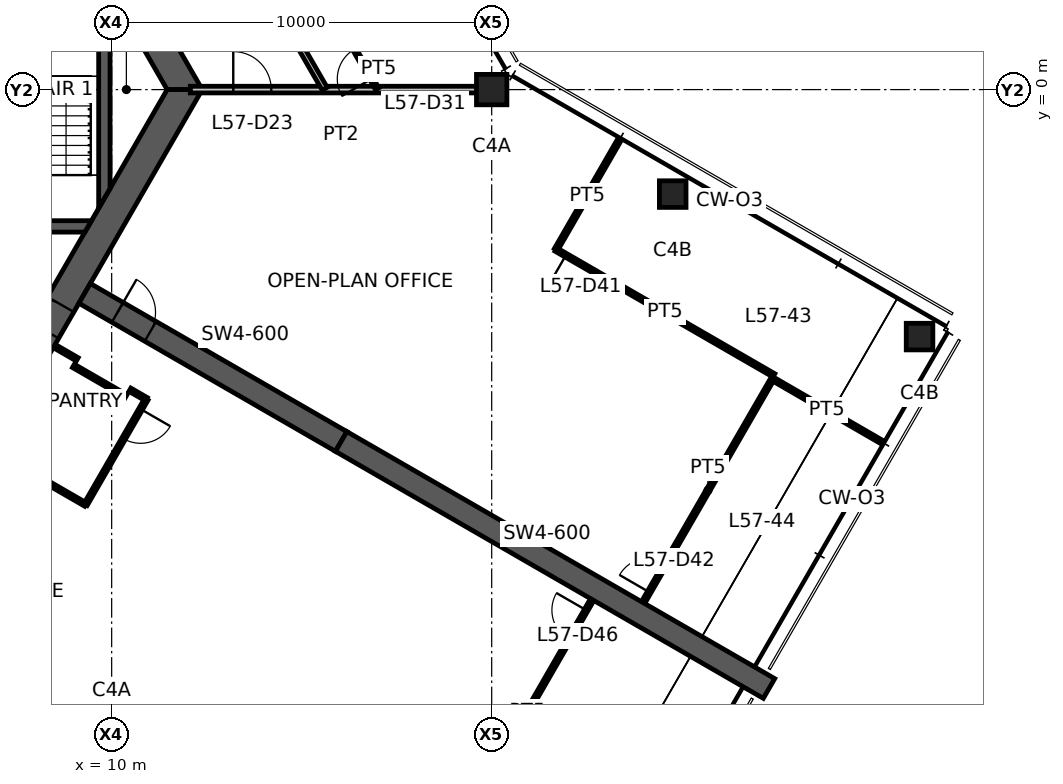
"""IFC4 building model, lengths in metres.
Left out: names, types, materials, properties, quantities, classifications, styles, units other than length and angle.
Written with IfcOpenShell. Run it as: python <this file> out.ifc"""

import sys

from ifc_helpers import new_model, si_unit, direction, frame, frame_2d, origin, origin_2d, place, context, subcontext, project, spatial, polyline, rectangle, hollow_rectangle, outline, extrude, element, fill, save


model = new_model("IFC4")
c1 = context("Model", 3, precision=1e-05, world=origin(), true_north=direction((0.0, 1.0)))
c2 = subcontext(c1, "Body", "Model", "MODEL_VIEW")
j1 = project(units=[si_unit("LENGTHUNIT", "METRE"), si_unit("PLANEANGLEUNIT", "RADIAN")], contexts=[c1])
p1 = place(None, origin())
s1 = spatial("IfcSite", under=j1, at=p1, CompositionType="ELEMENT")
p2 = place(p1, origin())
s2 = spatial("IfcBuilding", under=s1, at=p2, CompositionType="ELEMENT")
p3 = place(p2, frame((0.0, 0.0, 228.4)))
s3 = spatial("IfcBuildingStorey", under=s2, at=p3, CompositionType="ELEMENT", Elevation=228.4)
p4 = place(p3, frame((20.0, 0.0, 0.0), z_axis=(0.0, 0.0, 1.0), x_axis=(1.0, 0.0, 0.0)))
e1 = element("IfcColumn", 1, at=p4, inside=s3, PredefinedType="COLUMN", context=c2, shape_type="SweptSolid", body=[
    extrude(hollow_rectangle(XDim=0.8, YDim=0.8, WallThickness=0.04, at=origin_2d()), origin(), (0.0, 0.0, 1.0), 3.9),
])
for number, where, z_axis, x_axis in (
    (2, (24.763, -2.75, 0.0), (0.0, 0.0, 1.0), (1.0, 0.0, 0.0)),
    (3, (31.258, -6.5, 0.0), (0.0, 0.0, 1.0), (1.0, 0.0, 0.0)),
):
    element("IfcColumn", number, at=place(p3, frame(where, z_axis=z_axis, x_axis=x_axis)), inside=s3, PredefinedType="COLUMN", context=c2, shape_type="SweptSolid", body=[
        extrude(hollow_rectangle(XDim=0.7, YDim=0.7, WallThickness=0.032, at=origin_2d()), origin(), (0.0, 0.0, 1.0), 3.9),
    ])
p5 = place(p3, frame((11.922, 0.0, 0.0), z_axis=(0.0, 0.0, 1.0), x_axis=(-0.500004296715, 0.866022923061, 0.0)))
e4 = element("IfcWall", 4, at=p5, inside=s3, PredefinedType="SHEAR", context=c2, shape_type="SweptSolid", body=[
    extrude(outline(polyline([(-0.231, -0.4), (5.835, -0.4), (6.635, -0.4), (12.153, -0.4), (11.691, 0.4), (6.635, 0.4), (5.835, 0.4), (0.231, 0.4), (-0.231, -0.4)])), origin(), (0.0, 0.0, 1.0), 3.9),
])
p6 = place(p5, frame((5.835, 0.0, 0.0)))
e5 = element("IfcOpeningElement", 5, at=p6, cuts=e4, PredefinedType="OPENING", context=c2, shape_type="SweptSolid", body=[
    extrude(rectangle(XDim=0.8, YDim=2.1, at=frame_2d((0.4, 1.05))), frame((0.0, 0.41, 0.0), z_axis=(0.0, -1.0, 0.0), x_axis=(1.0, 0.0, 0.0)), (0.0, 0.0, 1.0), 0.82),
])
p7 = place(p3, frame((5.961, -10.325, 0.0), z_axis=(0.0, 0.0, 1.0), x_axis=(0.500004296715, 0.866022923061, 0.0)))
e6 = element("IfcWall", 6, at=p7, inside=s3, PredefinedType="SHEAR", context=c2, shape_type="SweptSolid", body=[
    extrude(outline(polyline([(-0.231, -0.4), (4.594, -0.4), (5.394, -0.4), (12.153, -0.4), (11.691, 0.4), (5.394, 0.4), (4.594, 0.4), (0.231, 0.4), (-0.231, -0.4)])), origin(), (0.0, 0.0, 1.0), 3.9),
])
p8 = place(p7, frame((4.594, 0.0, 0.0)))
e7 = element("IfcOpeningElement", 7, at=p8, cuts=e6, PredefinedType="OPENING", context=c2, shape_type="SweptSolid", body=[
    extrude(rectangle(XDim=0.8, YDim=2.1, at=frame_2d((0.4, 1.05))), frame((0.0, 0.41, 0.0), z_axis=(0.0, -1.0, 0.0), x_axis=(1.0, 0.0, 0.0)), (0.0, 0.0, 1.0), 0.82),
])
p9 = place(p3, frame((9.288, -5.363, 0.0), z_axis=(0.0, 0.0, 1.0), x_axis=(0.866031736626, -0.499989031036, 0.0)))
e8 = element("IfcWall", 8, at=p9, inside=s3, PredefinedType="SHEAR", context=c2, shape_type="SweptSolid", body=[
    extrude(rectangle(XDim=7.796, YDim=0.6, at=frame_2d((3.898, 0.0))), origin(), (0.0, 0.0, 1.0), 3.9),
])
p10 = place(p9, frame((1.0, 0.0, 0.0)))
e9 = element("IfcOpeningElement", 9, at=p10, cuts=e8, PredefinedType="OPENING", context=c2, shape_type="SweptSolid", body=[
    extrude(rectangle(XDim=1.0, YDim=2.1, at=frame_2d((0.5, 1.05))), frame((0.0, 0.31, 0.0), z_axis=(0.0, -1.0, 0.0), x_axis=(1.0, 0.0, 0.0)), (0.0, 0.0, 1.0), 0.62),
])
p11 = place(p3, frame((16.039, -9.26, 0.0), z_axis=(0.0, 0.0, 1.0), x_axis=(0.866024837091, -0.50000098154, 0.0)))
e10 = element("IfcWall", 10, at=p11, inside=s3, PredefinedType="SHEAR", context=c2, shape_type="SweptSolid", body=[
    extrude(rectangle(XDim=13.0, YDim=0.6, at=frame_2d((6.5, 0.0))), origin(), (0.0, 0.0, 1.0), 3.9),
])
p12 = place(p3, frame((1.45, -3.6, 0.0), z_axis=(0.0, 0.0, 1.0), x_axis=(1.0, 0.0, 0.0)))
e11 = element("IfcWall", 11, at=p12, inside=s3, PredefinedType="SHEAR", context=c2, shape_type="SweptSolid", body=[
    extrude(outline(polyline([(0.0, -0.15), (1.05, -0.15), (2.15, -0.15), (7.845, -0.15), (8.019, 0.15), (2.15, 0.15), (1.05, 0.15), (0.0, 0.15), (0.0, -0.15)])), origin(), (0.0, 0.0, 1.0), 3.9),
])
p13 = place(p12, frame((1.05, 0.0, 0.0)))
e12 = element("IfcOpeningElement", 12, at=p13, cuts=e11, PredefinedType="OPENING", context=c2, shape_type="SweptSolid", body=[
    extrude(rectangle(XDim=1.1, YDim=2.1, at=frame_2d((0.55, 1.05))), frame((0.0, 0.16, 0.0), z_axis=(0.0, -1.0, 0.0), x_axis=(1.0, 0.0, 0.0)), (0.0, 0.0, 1.0), 0.32),
])
p14 = place(p3, frame((9.808, -2.862, 0.0), z_axis=(0.0, 0.0, 1.0), x_axis=(0.0, 1.0, 0.0)))
e13 = element("IfcWall", 13, at=p14, inside=s3, PredefinedType="SHEAR", context=c2, shape_type="SweptSolid", body=[
    extrude(outline(polyline([(0.26, -0.15), (5.465, -0.15), (5.984, 0.15), (-0.26, 0.15), (0.26, -0.15)])), origin(), (0.0, 0.0, 1.0), 3.9),
])
p15 = place(p3, frame((12.07, 0.0, 0.0), z_axis=(0.0, 0.0, 1.0), x_axis=(1.0, 0.0, 0.0)))
e14 = element("IfcWall", 14, at=p15, inside=s3, PredefinedType="PARTITIONING", context=c2, shape_type="SweptSolid", body=[
    extrude(rectangle(XDim=7.93, YDim=0.175, at=frame_2d((3.965, 0.0))), origin(), (0.0, 0.0, 1.0), 3.05),
])
p16 = place(p15, frame((1.13, 0.0, 0.0)))
e15 = element("IfcOpeningElement", 15, at=p16, cuts=e14, PredefinedType="OPENING", context=c2, shape_type="SweptSolid", body=[
    extrude(rectangle(XDim=1.0, YDim=2.1, at=frame_2d((0.5, 1.05))), frame((0.0, 0.098, 0.0), z_axis=(0.0, -1.0, 0.0), x_axis=(1.0, 0.0, 0.0)), (0.0, 0.0, 1.0), 0.195),
])
p17 = place(p3, frame((11.011, 7.979, 0.0), z_axis=(0.0, 0.0, 1.0), x_axis=(0.49999917462, -0.866025880317, 0.0)))
e16 = element("IfcWall", 16, at=p17, inside=s3, PredefinedType="PARTITIONING", context=c2, shape_type="SweptSolid", body=[
    extrude(rectangle(XDim=9.19, YDim=0.15, at=frame_2d((4.595, 0.0))), origin(), (0.0, 0.0, 1.0), 2.95),
])
p18 = place(p17, frame((4.095, 0.0, 0.0)))
e17 = element("IfcOpeningElement", 17, at=p18, cuts=e16, PredefinedType="OPENING", context=c2, shape_type="SweptSolid", body=[
    extrude(rectangle(XDim=1.0, YDim=2.1, at=frame_2d((0.5, 1.05))), frame((0.0, 0.085, 0.0), z_axis=(0.0, -1.0, 0.0), x_axis=(1.0, 0.0, 0.0)), (0.0, 0.0, 1.0), 0.17),
])
p19 = place(p3, frame((16.986, 0.02, 0.0), z_axis=(0.0, 0.0, 1.0), x_axis=(-0.498096123952, 0.867121820337, 0.0)))
e18 = element("IfcWall", 18, at=p19, inside=s3, PredefinedType="PARTITIONING", context=c2, shape_type="SweptSolid", body=[
    extrude(rectangle(XDim=2.067, YDim=0.1, at=frame_2d((1.034, 0.0))), origin(), (0.0, 0.0, 1.0), 2.95),
])
p20 = place(p19, frame((0.3, 0.0, 0.0)))
e19 = element("IfcOpeningElement", 19, at=p20, cuts=e18, PredefinedType="OPENING", context=c2, shape_type="SweptSolid", body=[
    extrude(rectangle(XDim=0.9, YDim=2.1, at=frame_2d((0.45, 1.05))), frame((0.0, 0.06, 0.0), z_axis=(0.0, -1.0, 0.0), x_axis=(1.0, 0.0, 0.0)), (0.0, 0.0, 1.0), 0.12),
])
p21 = place(p3, frame((30.25, -9.266, 0.0), z_axis=(0.0, 0.0, 1.0), x_axis=(-0.865342122637, 0.501181614577, 0.0)))
e20 = element("IfcWall", 20, at=p21, inside=s3, PredefinedType="PARTITIONING", context=c2, shape_type="SweptSolid", body=[
    extrude(rectangle(XDim=3.311, YDim=0.1, at=frame_2d((1.655, 0.0))), origin(), (0.0, 0.0, 1.0), 2.95),
])
p22 = place(p3, frame((21.692, -4.21, 0.0), z_axis=(0.0, 0.0, 1.0), x_axis=(0.50002956483, 0.866008333849, 0.0)))
e21 = element("IfcWall", 21, at=p22, inside=s3, PredefinedType="PARTITIONING", context=c2, shape_type="SweptSolid", body=[
    extrude(rectangle(XDim=3.28, YDim=0.1, at=frame_2d((1.64, 0.0))), origin(), (0.0, 0.0, 1.0), 2.95),
])
p23 = place(p3, frame((27.425, -7.52, 0.0), z_axis=(0.0, 0.0, 1.0), x_axis=(-0.866030817826, 0.499990622488, 0.0)))
e22 = element("IfcWall", 22, at=p23, inside=s3, PredefinedType="PARTITIONING", context=c2, shape_type="SweptSolid", body=[
    extrude(rectangle(XDim=6.62, YDim=0.1, at=frame_2d((3.31, 0.0))), origin(), (0.0, 0.0, 1.0), 2.95),
])
p24 = place(p23, frame((5.42, 0.0, 0.0)))
e23 = element("IfcOpeningElement", 23, at=p24, cuts=e22, PredefinedType="OPENING", context=c2, shape_type="SweptSolid", body=[
    extrude(rectangle(XDim=0.9, YDim=2.1, at=frame_2d((0.45, 1.05))), frame((0.0, 0.06, 0.0), z_axis=(0.0, -1.0, 0.0), x_axis=(1.0, 0.0, 0.0)), (0.0, 0.0, 1.0), 0.12),
])
p25 = place(p3, frame((23.993, -13.483, 0.0), z_axis=(0.0, 0.0, 1.0), x_axis=(0.500522347083, 0.865723616445, 0.0)))
e24 = element("IfcWall", 24, at=p25, inside=s3, PredefinedType="PARTITIONING", context=c2, shape_type="SweptSolid", body=[
    extrude(rectangle(XDim=6.78, YDim=0.1, at=frame_2d((3.39, 0.0))), origin(), (0.0, 0.0, 1.0), 2.95),
])
p26 = place(p25, frame((0.3, 0.0, 0.0)))
e25 = element("IfcOpeningElement", 25, at=p26, cuts=e24, PredefinedType="OPENING", context=c2, shape_type="SweptSolid", body=[
    extrude(rectangle(XDim=0.9, YDim=2.1, at=frame_2d((0.45, 1.05))), frame((0.0, 0.06, 0.0), z_axis=(0.0, -1.0, 0.0), x_axis=(1.0, 0.0, 0.0)), (0.0, 0.0, 1.0), 0.12),
])
p27 = place(p3, frame((8.505, -6.758, 0.0), z_axis=(0.0, 0.0, 1.0), x_axis=(0.865958369053, -0.50011608959, 0.0)))
e26 = element("IfcWall", 26, at=p27, inside=s3, PredefinedType="PARTITIONING", context=c2, shape_type="SweptSolid", body=[
    extrude(rectangle(XDim=0.68, YDim=0.1, at=frame_2d((0.34, 0.0))), origin(), (0.0, 0.0, 1.0), 2.95),
])
p28 = place(p3, frame((8.994, -7.271, 0.0), z_axis=(0.0, 0.0, 1.0), x_axis=(0.865989903783, -0.500061482766, 0.0)))
e27 = element("IfcWall", 27, at=p28, inside=s3, PredefinedType="PARTITIONING", context=c2, shape_type="SweptSolid", body=[
    extrude(rectangle(XDim=1.6, YDim=0.1, at=frame_2d((0.8, 0.0))), origin(), (0.0, 0.0, 1.0), 2.95),
])
p29 = place(p3, frame((9.313, -10.919, 0.0), z_axis=(0.0, 0.0, 1.0), x_axis=(-0.865996920067, 0.500049332001, 0.0)))
e28 = element("IfcWall", 28, at=p29, inside=s3, PredefinedType="PARTITIONING", context=c2, shape_type="SweptSolid", body=[
    extrude(rectangle(XDim=2.78, YDim=0.1, at=frame_2d((1.39, 0.0))), origin(), (0.0, 0.0, 1.0), 2.95),
])
p30 = place(p3, frame((10.48, -7.898, 0.0), z_axis=(0.0, 0.0, 1.0), x_axis=(0.866071776036, -0.499919672301, 0.0)))
e29 = element("IfcWall", 29, at=p30, inside=s3, PredefinedType="PARTITIONING", context=c2, shape_type="SweptSolid", body=[
    extrude(rectangle(XDim=0.5, YDim=0.1, at=frame_2d((0.25, 0.0))), origin(), (0.0, 0.0, 1.0), 2.95),
])
p31 = place(p3, frame((10.913, -8.148, 0.0), z_axis=(0.0, 0.0, 1.0), x_axis=(-0.500028443584, -0.866008981251, 0.0)))
e30 = element("IfcWall", 30, at=p31, inside=s3, PredefinedType="PARTITIONING", context=c2, shape_type="SweptSolid", body=[
    extrude(rectangle(XDim=3.2, YDim=0.1, at=frame_2d((1.6, 0.0))), origin(), (0.0, 0.0, 1.0), 2.95),
])
p32 = place(p31, frame((0.3, 0.0, 0.0)))
e31 = element("IfcOpeningElement", 31, at=p32, cuts=e30, PredefinedType="OPENING", context=c2, shape_type="SweptSolid", body=[
    extrude(rectangle(XDim=0.9, YDim=2.1, at=frame_2d((0.45, 1.05))), frame((0.0, 0.06, 0.0), z_axis=(0.0, -1.0, 0.0), x_axis=(1.0, 0.0, 0.0)), (0.0, 0.0, 1.0), 0.12),
])
p33 = place(p3, frame((19.248, -19.311, 0.0), z_axis=(0.0, 0.0, 1.0), x_axis=(0.499489671712, 0.866319841544, 0.0)))
e32 = element("IfcWall", 32, at=p33, inside=s3, PredefinedType="PARTITIONING", context=c2, shape_type="SweptSolid", body=[
    extrude(rectangle(XDim=6.78, YDim=0.1, at=frame_2d((3.39, 0.0))), origin(), (0.0, 0.0, 1.0), 2.95),
])
p34 = place(p33, frame((5.58, 0.0, 0.0)))
e33 = element("IfcOpeningElement", 33, at=p34, cuts=e32, PredefinedType="OPENING", context=c2, shape_type="SweptSolid", body=[
    extrude(rectangle(XDim=0.9, YDim=2.1, at=frame_2d((0.45, 1.05))), frame((0.0, 0.06, 0.0), z_axis=(0.0, -1.0, 0.0), x_axis=(1.0, 0.0, 0.0)), (0.0, 0.0, 1.0), 0.12),
])
p35 = place(p8, origin())
e34 = element("IfcDoor", 34, at=p35, inside=s3, OperationType="SINGLE_SWING_LEFT", PredefinedType="DOOR", context=c2, shape_type="SweptSolid", body=[
    extrude(rectangle(XDim=0.8, YDim=2.1, at=frame_2d((0.4, 1.05))), frame((0.0, 0.025, 0.0), z_axis=(0.0, -1.0, 0.0), x_axis=(1.0, 0.0, 0.0)), (0.0, 0.0, 1.0), 0.05),
])
fill(e7, e34)
p36 = place(p10, origin())
e35 = element("IfcDoor", 35, at=p36, inside=s3, OperationType="SINGLE_SWING_LEFT", PredefinedType="DOOR", context=c2, shape_type="SweptSolid", body=[
    extrude(rectangle(XDim=1.0, YDim=2.1, at=frame_2d((0.5, 1.05))), frame((0.0, 0.025, 0.0), z_axis=(0.0, -1.0, 0.0), x_axis=(1.0, 0.0, 0.0)), (0.0, 0.0, 1.0), 0.05),
])
fill(e9, e35)
p37 = place(p16, origin())
e36 = element("IfcDoor", 36, at=p37, inside=s3, OperationType="SINGLE_SWING_LEFT", PredefinedType="DOOR", context=c2, shape_type="SweptSolid", body=[
    extrude(rectangle(XDim=1.0, YDim=2.1, at=frame_2d((0.5, 1.05))), frame((0.0, 0.025, 0.0), z_axis=(0.0, -1.0, 0.0), x_axis=(1.0, 0.0, 0.0)), (0.0, 0.0, 1.0), 0.05),
])
fill(e15, e36)
p38 = place(p20, origin())
e37 = element("IfcDoor", 37, at=p38, inside=s3, OperationType="SINGLE_SWING_LEFT", PredefinedType="DOOR", context=c2, shape_type="SweptSolid", body=[
    extrude(rectangle(XDim=0.9, YDim=2.1, at=frame_2d((0.45, 1.05))), frame((0.0, 0.025, 0.0), z_axis=(0.0, -1.0, 0.0), x_axis=(1.0, 0.0, 0.0)), (0.0, 0.0, 1.0), 0.05),
])
fill(e19, e37)
p39 = place(p24, origin())
e38 = element("IfcDoor", 38, at=p39, inside=s3, OperationType="SINGLE_SWING_RIGHT", PredefinedType="DOOR", context=c2, shape_type="SweptSolid", body=[
    extrude(rectangle(XDim=0.9, YDim=2.1, at=frame_2d((0.45, 1.05))), frame((0.0, 0.025, 0.0), z_axis=(0.0, -1.0, 0.0), x_axis=(1.0, 0.0, 0.0)), (0.0, 0.0, 1.0), 0.05),
])
fill(e23, e38)
p40 = place(p26, origin())
e39 = element("IfcDoor", 39, at=p40, inside=s3, OperationType="SINGLE_SWING_LEFT", PredefinedType="DOOR", context=c2, shape_type="SweptSolid", body=[
    extrude(rectangle(XDim=0.9, YDim=2.1, at=frame_2d((0.45, 1.05))), frame((0.0, 0.025, 0.0), z_axis=(0.0, -1.0, 0.0), x_axis=(1.0, 0.0, 0.0)), (0.0, 0.0, 1.0), 0.05),
])
fill(e25, e39)
p41 = place(p32, origin())
e40 = element("IfcDoor", 40, at=p41, inside=s3, OperationType="SINGLE_SWING_LEFT", PredefinedType="DOOR", context=c2, shape_type="SweptSolid", body=[
    extrude(rectangle(XDim=0.9, YDim=2.1, at=frame_2d((0.45, 1.05))), frame((0.0, 0.025, 0.0), z_axis=(0.0, -1.0, 0.0), x_axis=(1.0, 0.0, 0.0)), (0.0, 0.0, 1.0), 0.05),
])
fill(e31, e40)
p42 = place(p34, origin())
e41 = element("IfcDoor", 41, at=p42, inside=s3, OperationType="SINGLE_SWING_RIGHT", PredefinedType="DOOR", context=c2, shape_type="SweptSolid", body=[
    extrude(rectangle(XDim=0.9, YDim=2.1, at=frame_2d((0.45, 1.05))), frame((0.0, 0.025, 0.0), z_axis=(0.0, -1.0, 0.0), x_axis=(1.0, 0.0, 0.0)), (0.0, 0.0, 1.0), 0.05),
])
fill(e33, e41)
save(model, sys.argv[1])
